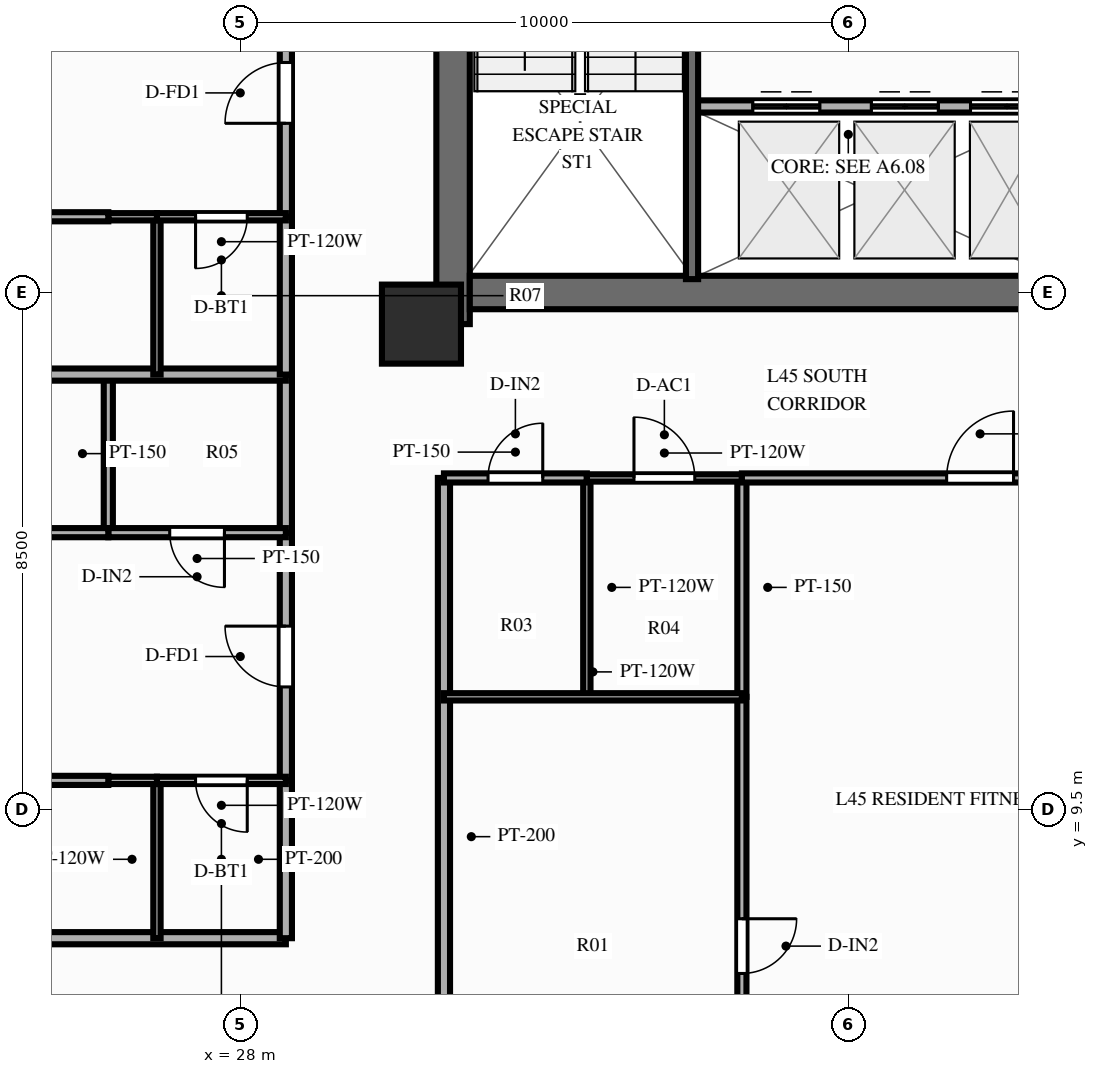
"""IFC4 building model, lengths in metres.
Left out: names, types, materials, properties, quantities, classifications, styles, units other than length and angle.
Written with IfcOpenShell. Run it as: python <this file> out.ifc"""

import sys

from ifc_helpers import new_model, si_unit, direction, frame, frame_2d, origin, origin_2d, place, context, subcontext, project, spatial, rectangle, extrude, source, transform, mapped, element, fill, save


model = new_model("IFC4")
c1 = context("Model", 3, precision=1e-05, world=origin(), true_north=direction((0.0, 1.0)))
c2 = subcontext(c1, "Body", "Model", "MODEL_VIEW")
j1 = project(units=[si_unit("LENGTHUNIT", "METRE"), si_unit("PLANEANGLEUNIT", "RADIAN")], contexts=[c1])
p1 = place(None, origin())
s1 = spatial("IfcSite", under=j1, at=p1, CompositionType="ELEMENT")
p2 = place(p1, origin())
s2 = spatial("IfcBuilding", under=s1, at=p2, CompositionType="ELEMENT")
p3 = place(p2, frame((0.0, 0.0, 141.75)))
s3 = spatial("IfcBuildingStorey", under=s2, at=p3, CompositionType="ELEMENT", Elevation=141.75)
p4 = place(p3, frame((31.5, 17.48, 0.0), z_axis=(0.0, 0.0, 1.0), x_axis=(0.0, 1.0, 0.0)))
e1 = element("IfcWall", 1, at=p4, inside=s3, PredefinedType="SHEAR", context=c2, shape_type="SweptSolid", body=[
    extrude(rectangle(XDim=19.04, YDim=0.55, at=frame_2d((9.52, 0.0))), origin(), (0.0, 0.0, 1.0), 3.0),
])
p5 = place(p4, frame((6.32, 0.0, 0.0)))
e2 = element("IfcOpeningElement", 2, at=p5, cuts=e1, PredefinedType="OPENING", context=c2, shape_type="SweptSolid", body=[
    extrude(rectangle(XDim=1.1, YDim=2.15, at=frame_2d((0.55, 1.075))), frame((0.0, 0.287, 0.0), z_axis=(0.0, -1.0, 0.0), x_axis=(1.0, 0.0, 0.0)), (0.0, 0.0, 1.0), 0.574),
])
p6 = place(p3, frame((31.775, 18.0, 0.0), z_axis=(0.0, 0.0, 1.0), x_axis=(1.0, 0.0, 0.0)))
e3 = element("IfcWall", 3, at=p6, inside=s3, PredefinedType="SHEAR", context=c2, shape_type="SweptSolid", body=[
    extrude(rectangle(XDim=12.45, YDim=0.55, at=frame_2d((6.225, 0.0))), origin(), (0.0, 0.0, 1.0), 3.0),
])
m1 = source(origin(), c2, "Body", "SweptSolid", [
    extrude(rectangle(XDim=1.3, YDim=1.3, at=origin_2d()), origin(), (0.0, 0.0, 1.0), 3.0),
])
p7 = place(p3, frame((30.98, 17.48, 0.0), z_axis=(0.0, 0.0, 1.0), x_axis=(1.0, 0.0, 0.0)))
e4 = element("IfcColumn", 4, at=p7, inside=s3, PredefinedType="COLUMN", context=c2, shape_type="MappedRepresentation", body=[
    mapped(m1, transform((0.0, 0.0, 0.0), scale=1.0)),
])
p8 = place(p3, frame((35.43, 21.06, 0.0), z_axis=(0.0, 0.0, 1.0), x_axis=(1.0, 0.0, 0.0)))
e5 = element("IfcWall", 5, at=p8, inside=s3, PredefinedType="PARTITIONING", context=c2, shape_type="SweptSolid", body=[
    extrude(rectangle(XDim=6.02, YDim=0.2, at=frame_2d((3.01, 0.0))), origin(), (0.0, 0.0, 1.0), 2.7),
])
p9 = place(p8, frame((1.0, 0.0, 0.0)))
e6 = element("IfcOpeningElement", 6, at=p9, cuts=e5, PredefinedType="OPENING", context=c2, shape_type="SweptSolid", body=[
    extrude(rectangle(XDim=1.1, YDim=2.15, at=frame_2d((0.55, 1.075))), frame((0.0, 0.112, 0.0), z_axis=(0.0, -1.0, 0.0), x_axis=(1.0, 0.0, 0.0)), (0.0, 0.0, 1.0), 0.224),
])
p10 = place(p8, frame((2.95, 0.0, 0.0)))
e7 = element("IfcOpeningElement", 7, at=p10, cuts=e5, PredefinedType="OPENING", context=c2, shape_type="SweptSolid", body=[
    extrude(rectangle(XDim=1.1, YDim=2.15, at=frame_2d((0.55, 1.075))), frame((0.0, 0.112, 0.0), z_axis=(0.0, -1.0, 0.0), x_axis=(1.0, 0.0, 0.0)), (0.0, 0.0, 1.0), 0.224),
])
p11 = place(p8, frame((4.58, 0.0, 0.0)))
e8 = element("IfcOpeningElement", 8, at=p11, cuts=e5, PredefinedType="OPENING", context=c2, shape_type="SweptSolid", body=[
    extrude(rectangle(XDim=1.2, YDim=2.15, at=frame_2d((0.6, 1.075))), frame((0.0, 0.112, 0.0), z_axis=(0.0, -1.0, 0.0), x_axis=(1.0, 0.0, 0.0)), (0.0, 0.0, 1.0), 0.224),
])
p12 = place(p3, frame((35.43, 18.22, 0.0), z_axis=(0.0, 0.0, 1.0), x_axis=(0.0, 1.0, 0.0)))
e9 = element("IfcWall", 9, at=p12, inside=s3, PredefinedType="SOLIDWALL", context=c2, shape_type="SweptSolid", body=[
    extrude(rectangle(XDim=7.22, YDim=0.2, at=frame_2d((3.61, 0.0))), origin(), (0.0, 0.0, 1.0), 2.7),
])
p13 = place(p12, frame((6.68, 0.0, 0.0), z_axis=(0.0, 0.0, 1.0), x_axis=(-1.0, 0.0, 0.0)))
e10 = element("IfcOpeningElement", 10, at=p13, cuts=e9, PredefinedType="OPENING", context=c2, shape_type="SweptSolid", body=[
    extrude(rectangle(XDim=1.1, YDim=2.15, at=frame_2d((0.55, 1.075))), frame((0.0, 0.112, 0.0), z_axis=(0.0, -1.0, 0.0), x_axis=(1.0, 0.0, 0.0)), (0.0, 0.0, 1.0), 0.224),
])
p14 = place(p3, frame((31.35, 14.95, 0.0), z_axis=(0.0, 0.0, 1.0), x_axis=(0.0, -1.0, 0.0)))
e11 = element("IfcWall", 11, at=p14, inside=s3, PredefinedType="PARTITIONING", context=c2, shape_type="SweptSolid", body=[
    extrude(rectangle(XDim=11.8, YDim=0.2, at=frame_2d((5.9, 0.0))), origin(), (0.0, 0.0, 1.0), 2.34),
])
p15 = place(p3, frame((33.7, 14.95, 0.0), z_axis=(0.0, 0.0, 1.0), x_axis=(0.0, -1.0, 0.0)))
e12 = element("IfcWall", 12, at=p15, inside=s3, PredefinedType="PARTITIONING", context=c2, shape_type="SweptSolid", body=[
    extrude(rectangle(XDim=3.6, YDim=0.12, at=frame_2d((1.8, 0.0))), origin(), (0.0, 0.0, 1.0), 2.7),
])
p16 = place(p3, frame((36.25, 14.95, 0.0), z_axis=(0.0, 0.0, 1.0), x_axis=(0.0, -1.0, 0.0)))
e13 = element("IfcWall", 13, at=p16, inside=s3, PredefinedType="PARTITIONING", context=c2, shape_type="SweptSolid", body=[
    extrude(rectangle(XDim=3.6, YDim=0.15, at=frame_2d((1.8, 0.0))), origin(), (0.0, 0.0, 1.0), 2.7),
])
p17 = place(p3, frame((36.25, 11.35, 0.0), z_axis=(0.0, 0.0, 1.0), x_axis=(0.0, -1.0, 0.0)))
e14 = element("IfcWall", 14, at=p17, inside=s3, PredefinedType="PARTITIONING", context=c2, shape_type="SweptSolid", body=[
    extrude(rectangle(XDim=8.2, YDim=0.15, at=frame_2d((4.1, 0.0))), origin(), (0.0, 0.0, 1.0), 2.7),
])
p18 = place(p17, frame((3.65, 0.0, 0.0)))
e15 = element("IfcOpeningElement", 15, at=p18, cuts=e14, PredefinedType="OPENING", context=c2, shape_type="SweptSolid", body=[
    extrude(rectangle(XDim=0.9, YDim=2.1, at=frame_2d((0.45, 1.05))), frame((0.0, 0.087, 0.0), z_axis=(0.0, -1.0, 0.0), x_axis=(1.0, 0.0, 0.0)), (0.0, 0.0, 1.0), 0.174),
])
p19 = place(p3, frame((31.35, 11.35, 0.0), z_axis=(0.0, 0.0, 1.0), x_axis=(1.0, 0.0, 0.0)))
e16 = element("IfcWall", 16, at=p19, inside=s3, PredefinedType="PARTITIONING", context=c2, shape_type="SweptSolid", body=[
    extrude(rectangle(XDim=4.9, YDim=0.12, at=frame_2d((2.45, 0.0))), origin(), (0.0, 0.0, 1.0), 2.7),
])
p20 = place(p3, frame((31.35, 14.95, 0.0), z_axis=(0.0, 0.0, 1.0), x_axis=(1.0, 0.0, 0.0)))
e17 = element("IfcWall", 17, at=p20, inside=s3, PredefinedType="PARTITIONING", context=c2, shape_type="SweptSolid", body=[
    extrude(rectangle(XDim=2.35, YDim=0.15, at=frame_2d((1.175, 0.0))), origin(), (0.0, 0.0, 1.0), 2.7),
])
p21 = place(p20, frame((0.725, 0.0, 0.0)))
e18 = element("IfcOpeningElement", 18, at=p21, cuts=e17, PredefinedType="OPENING", context=c2, shape_type="SweptSolid", body=[
    extrude(rectangle(XDim=0.9, YDim=2.1, at=frame_2d((0.45, 1.05))), frame((0.0, 0.087, 0.0), z_axis=(0.0, -1.0, 0.0), x_axis=(1.0, 0.0, 0.0)), (0.0, 0.0, 1.0), 0.174),
])
p22 = place(p3, frame((33.7, 14.95, 0.0), z_axis=(0.0, 0.0, 1.0), x_axis=(1.0, 0.0, 0.0)))
e19 = element("IfcWall", 19, at=p22, inside=s3, PredefinedType="PARTITIONING", context=c2, shape_type="SweptSolid", body=[
    extrude(rectangle(XDim=2.55, YDim=0.12, at=frame_2d((1.275, 0.0))), origin(), (0.0, 0.0, 1.0), 2.7),
])
p23 = place(p22, frame((0.775, 0.0, 0.0)))
e20 = element("IfcOpeningElement", 20, at=p23, cuts=e19, PredefinedType="OPENING", context=c2, shape_type="SweptSolid", body=[
    extrude(rectangle(XDim=1.0, YDim=2.1, at=frame_2d((0.5, 1.05))), frame((0.0, 0.072, 0.0), z_axis=(0.0, -1.0, 0.0), x_axis=(1.0, 0.0, 0.0)), (0.0, 0.0, 1.0), 0.144),
])
p24 = place(p3, frame((36.25, 14.95, 0.0), z_axis=(0.0, 0.0, 1.0), x_axis=(1.0, 0.0, 0.0)))
e21 = element("IfcWall", 21, at=p24, inside=s3, PredefinedType="PARTITIONING", context=c2, shape_type="SweptSolid", body=[
    extrude(rectangle(XDim=8.4, YDim=0.15, at=frame_2d((4.2, 0.0))), origin(), (0.0, 0.0, 1.0), 2.7),
])
p25 = place(p24, frame((3.367, 0.0, 0.0)))
e22 = element("IfcOpeningElement", 22, at=p25, cuts=e21, PredefinedType="OPENING", context=c2, shape_type="SweptSolid", body=[
    extrude(rectangle(XDim=1.1, YDim=2.15, at=frame_2d((0.55, 1.075))), frame((0.0, 0.087, 0.0), z_axis=(0.0, -1.0, 0.0), x_axis=(1.0, 0.0, 0.0)), (0.0, 0.0, 1.0), 0.174),
])
p26 = place(p3, frame((28.75, 7.38, 0.0), z_axis=(0.0, 0.0, 1.0), x_axis=(-1.0, 0.0, 0.0)))
e23 = element("IfcWall", 23, at=p26, inside=s3, PredefinedType="PARTITIONING", context=c2, shape_type="SweptSolid", body=[
    extrude(rectangle(XDim=16.6, YDim=0.2, at=frame_2d((8.3, 0.0))), origin(), (0.0, 0.0, 1.0), 2.7),
])
p27 = place(p3, frame((28.75, 7.38, 0.0), z_axis=(0.0, 0.0, 1.0), x_axis=(0.0, 1.0, 0.0)))
e24 = element("IfcWall", 24, at=p27, inside=s3, PredefinedType="PARTITIONING", context=c2, shape_type="SweptSolid", body=[
    extrude(rectangle(XDim=2.596, YDim=0.2, at=frame_2d((1.298, 0.0))), origin(), (0.0, 0.0, 1.0), 2.7),
])
p28 = place(p3, frame((28.75, 9.976, 0.0), z_axis=(0.0, 0.0, 1.0), x_axis=(0.0, 1.0, 0.0)))
e25 = element("IfcWall", 25, at=p28, inside=s3, PredefinedType="PARTITIONING", context=c2, shape_type="SweptSolid", body=[
    extrude(rectangle(XDim=4.074, YDim=0.2, at=frame_2d((2.037, 0.0))), origin(), (0.0, 0.0, 1.0), 2.7),
])
p29 = place(p28, frame((1.537, 0.0, 0.0)))
e26 = element("IfcOpeningElement", 26, at=p29, cuts=e25, PredefinedType="OPENING", context=c2, shape_type="SweptSolid", body=[
    extrude(rectangle(XDim=1.0, YDim=2.15, at=frame_2d((0.5, 1.075))), frame((0.0, 0.112, 0.0), z_axis=(0.0, -1.0, 0.0), x_axis=(1.0, 0.0, 0.0)), (0.0, 0.0, 1.0), 0.224),
])
p30 = place(p3, frame((28.75, 14.05, 0.0), z_axis=(0.0, 0.0, 1.0), x_axis=(0.0, 1.0, 0.0)))
e27 = element("IfcWall", 27, at=p30, inside=s3, PredefinedType="PARTITIONING", context=c2, shape_type="SweptSolid", body=[
    extrude(rectangle(XDim=2.6, YDim=0.2, at=frame_2d((1.3, 0.0))), origin(), (0.0, 0.0, 1.0), 2.7),
])
p31 = place(p3, frame((26.63, 7.38, 0.0), z_axis=(0.0, 0.0, 1.0), x_axis=(0.0, 1.0, 0.0)))
e28 = element("IfcWall", 28, at=p31, inside=s3, PredefinedType="PARTITIONING", context=c2, shape_type="SweptSolid", body=[
    extrude(rectangle(XDim=2.596, YDim=0.12, at=frame_2d((1.298, 0.0))), origin(), (0.0, 0.0, 1.0), 2.7),
])
p32 = place(p3, frame((25.83, 14.05, 0.0), z_axis=(0.0, 0.0, 1.0), x_axis=(0.0, 1.0, 0.0)))
e29 = element("IfcWall", 29, at=p32, inside=s3, PredefinedType="PARTITIONING", context=c2, shape_type="SweptSolid", body=[
    extrude(rectangle(XDim=2.6, YDim=0.15, at=frame_2d((1.3, 0.0))), origin(), (0.0, 0.0, 1.0), 2.7),
])
p33 = place(p3, frame((28.75, 9.976, 0.0), z_axis=(0.0, 0.0, 1.0), x_axis=(-1.0, 0.0, 0.0)))
e30 = element("IfcWall", 30, at=p33, inside=s3, PredefinedType="PARTITIONING", context=c2, shape_type="SweptSolid", body=[
    extrude(rectangle(XDim=2.12, YDim=0.12, at=frame_2d((1.06, 0.0))), origin(), (0.0, 0.0, 1.0), 2.7),
])
p34 = place(p33, frame((0.635, 0.0, 0.0)))
e31 = element("IfcOpeningElement", 31, at=p34, cuts=e30, PredefinedType="OPENING", context=c2, shape_type="SweptSolid", body=[
    extrude(rectangle(XDim=0.85, YDim=2.05, at=frame_2d((0.425, 1.025))), frame((0.0, 0.072, 0.0), z_axis=(0.0, -1.0, 0.0), x_axis=(1.0, 0.0, 0.0)), (0.0, 0.0, 1.0), 0.144),
])
p35 = place(p3, frame((26.63, 9.976, 0.0), z_axis=(0.0, 0.0, 1.0), x_axis=(-1.0, 0.0, 0.0)))
e32 = element("IfcWall", 32, at=p35, inside=s3, PredefinedType="PARTITIONING", context=c2, shape_type="SweptSolid", body=[
    extrude(rectangle(XDim=0.8, YDim=0.12, at=frame_2d((0.4, 0.0))), origin(), (0.0, 0.0, 1.0), 2.7),
])
p36 = place(p3, frame((25.83, 9.976, 0.0), z_axis=(0.0, 0.0, 1.0), x_axis=(-1.0, 0.0, 0.0)))
e33 = element("IfcWall", 33, at=p36, inside=s3, PredefinedType="PARTITIONING", context=c2, shape_type="SweptSolid", body=[
    extrude(rectangle(XDim=13.68, YDim=0.15, at=frame_2d((6.84, 0.0))), origin(), (0.0, 0.0, 1.0), 2.7),
])
p37 = place(p36, frame((5.877, 0.0, 0.0)))
e34 = element("IfcOpeningElement", 34, at=p37, cuts=e33, PredefinedType="OPENING", context=c2, shape_type="SweptSolid", body=[
    extrude(rectangle(XDim=0.9, YDim=2.1, at=frame_2d((0.45, 1.05))), frame((0.0, 0.087, 0.0), z_axis=(0.0, -1.0, 0.0), x_axis=(1.0, 0.0, 0.0)), (0.0, 0.0, 1.0), 0.174),
])
p38 = place(p3, frame((28.75, 14.05, 0.0), z_axis=(0.0, 0.0, 1.0), x_axis=(-1.0, 0.0, 0.0)))
e35 = element("IfcWall", 35, at=p38, inside=s3, PredefinedType="PARTITIONING", context=c2, shape_type="SweptSolid", body=[
    extrude(rectangle(XDim=2.92, YDim=0.15, at=frame_2d((1.46, 0.0))), origin(), (0.0, 0.0, 1.0), 2.7),
])
p39 = place(p38, frame((1.01, 0.0, 0.0)))
e36 = element("IfcOpeningElement", 36, at=p39, cuts=e35, PredefinedType="OPENING", context=c2, shape_type="SweptSolid", body=[
    extrude(rectangle(XDim=0.9, YDim=2.1, at=frame_2d((0.45, 1.05))), frame((0.0, 0.087, 0.0), z_axis=(0.0, -1.0, 0.0), x_axis=(1.0, 0.0, 0.0)), (0.0, 0.0, 1.0), 0.174),
])
p40 = place(p3, frame((25.83, 14.05, 0.0), z_axis=(0.0, 0.0, 1.0), x_axis=(-1.0, 0.0, 0.0)))
e37 = element("IfcWall", 37, at=p40, inside=s3, PredefinedType="PARTITIONING", context=c2, shape_type="SweptSolid", body=[
    extrude(rectangle(XDim=13.68, YDim=0.15, at=frame_2d((6.84, 0.0))), origin(), (0.0, 0.0, 1.0), 2.7),
])
p41 = place(p40, frame((5.877, 0.0, 0.0)))
e38 = element("IfcOpeningElement", 38, at=p41, cuts=e37, PredefinedType="OPENING", context=c2, shape_type="SweptSolid", body=[
    extrude(rectangle(XDim=0.9, YDim=2.1, at=frame_2d((0.45, 1.05))), frame((0.0, 0.087, 0.0), z_axis=(0.0, -1.0, 0.0), x_axis=(1.0, 0.0, 0.0)), (0.0, 0.0, 1.0), 0.174),
])
p42 = place(p3, frame((28.75, 16.65, 0.0), z_axis=(0.0, 0.0, 1.0), x_axis=(-1.0, 0.0, 0.0)))
e39 = element("IfcWall", 39, at=p42, inside=s3, PredefinedType="PARTITIONING", context=c2, shape_type="SweptSolid", body=[
    extrude(rectangle(XDim=16.6, YDim=0.2, at=frame_2d((8.3, 0.0))), origin(), (0.0, 0.0, 1.0), 2.7),
])
p43 = place(p3, frame((28.75, 16.65, 0.0), z_axis=(0.0, 0.0, 1.0), x_axis=(0.0, 1.0, 0.0)))
e40 = element("IfcWall", 40, at=p43, inside=s3, PredefinedType="PARTITIONING", context=c2, shape_type="SweptSolid", body=[
    extrude(rectangle(XDim=2.596, YDim=0.2, at=frame_2d((1.298, 0.0))), origin(), (0.0, 0.0, 1.0), 2.7),
])
p44 = place(p3, frame((28.75, 19.246, 0.0), z_axis=(0.0, 0.0, 1.0), x_axis=(0.0, 1.0, 0.0)))
e41 = element("IfcWall", 41, at=p44, inside=s3, PredefinedType="PARTITIONING", context=c2, shape_type="SweptSolid", body=[
    extrude(rectangle(XDim=4.074, YDim=0.2, at=frame_2d((2.037, 0.0))), origin(), (0.0, 0.0, 1.0), 2.7),
])
p45 = place(p44, frame((1.537, 0.0, 0.0)))
e42 = element("IfcOpeningElement", 42, at=p45, cuts=e41, PredefinedType="OPENING", context=c2, shape_type="SweptSolid", body=[
    extrude(rectangle(XDim=1.0, YDim=2.15, at=frame_2d((0.5, 1.075))), frame((0.0, 0.112, 0.0), z_axis=(0.0, -1.0, 0.0), x_axis=(1.0, 0.0, 0.0)), (0.0, 0.0, 1.0), 0.224),
])
p46 = place(p3, frame((26.63, 16.65, 0.0), z_axis=(0.0, 0.0, 1.0), x_axis=(0.0, 1.0, 0.0)))
e43 = element("IfcWall", 43, at=p46, inside=s3, PredefinedType="PARTITIONING", context=c2, shape_type="SweptSolid", body=[
    extrude(rectangle(XDim=2.596, YDim=0.12, at=frame_2d((1.298, 0.0))), origin(), (0.0, 0.0, 1.0), 2.7),
])
p47 = place(p3, frame((28.75, 19.246, 0.0), z_axis=(0.0, 0.0, 1.0), x_axis=(-1.0, 0.0, 0.0)))
e44 = element("IfcWall", 44, at=p47, inside=s3, PredefinedType="PARTITIONING", context=c2, shape_type="SweptSolid", body=[
    extrude(rectangle(XDim=2.12, YDim=0.12, at=frame_2d((1.06, 0.0))), origin(), (0.0, 0.0, 1.0), 2.7),
])
p48 = place(p47, frame((0.635, 0.0, 0.0)))
e45 = element("IfcOpeningElement", 45, at=p48, cuts=e44, PredefinedType="OPENING", context=c2, shape_type="SweptSolid", body=[
    extrude(rectangle(XDim=0.85, YDim=2.05, at=frame_2d((0.425, 1.025))), frame((0.0, 0.072, 0.0), z_axis=(0.0, -1.0, 0.0), x_axis=(1.0, 0.0, 0.0)), (0.0, 0.0, 1.0), 0.144),
])
p49 = place(p3, frame((26.63, 19.246, 0.0), z_axis=(0.0, 0.0, 1.0), x_axis=(-1.0, 0.0, 0.0)))
e46 = element("IfcWall", 46, at=p49, inside=s3, PredefinedType="PARTITIONING", context=c2, shape_type="SweptSolid", body=[
    extrude(rectangle(XDim=0.8, YDim=0.12, at=frame_2d((0.4, 0.0))), origin(), (0.0, 0.0, 1.0), 2.7),
])
p50 = place(p3, frame((25.83, 19.246, 0.0), z_axis=(0.0, 0.0, 1.0), x_axis=(-1.0, 0.0, 0.0)))
e47 = element("IfcWall", 47, at=p50, inside=s3, PredefinedType="PARTITIONING", context=c2, shape_type="SweptSolid", body=[
    extrude(rectangle(XDim=13.68, YDim=0.15, at=frame_2d((6.84, 0.0))), origin(), (0.0, 0.0, 1.0), 2.7),
])
p51 = place(p50, frame((5.877, 0.0, 0.0)))
e48 = element("IfcOpeningElement", 48, at=p51, cuts=e47, PredefinedType="OPENING", context=c2, shape_type="SweptSolid", body=[
    extrude(rectangle(XDim=0.9, YDim=2.1, at=frame_2d((0.45, 1.05))), frame((0.0, 0.087, 0.0), z_axis=(0.0, -1.0, 0.0), x_axis=(1.0, 0.0, 0.0)), (0.0, 0.0, 1.0), 0.174),
])
m2 = source(origin(), c2, "Body", "SweptSolid", [
    extrude(rectangle(XDim=1.1, YDim=2.15, at=frame_2d((0.55, 1.075))), frame((0.0, 0.025, 0.0), z_axis=(0.0, -1.0, 0.0), x_axis=(1.0, 0.0, 0.0)), (0.0, 0.0, 1.0), 0.05),
])
p52 = place(p9, origin())
e49 = element("IfcDoor", 49, at=p52, inside=s3, OperationType="DOUBLE_DOOR_SLIDING", PredefinedType="DOOR", context=c2, shape_type="MappedRepresentation", body=[
    mapped(m2, transform((0.0, 0.0, 0.0), scale=1.0)),
])
fill(e6, e49)
p53 = place(p10, origin())
e50 = element("IfcDoor", 50, at=p53, inside=s3, OperationType="DOUBLE_DOOR_SLIDING", PredefinedType="DOOR", context=c2, shape_type="MappedRepresentation", body=[
    mapped(m2, transform((0.0, 0.0, 0.0), scale=1.0)),
])
fill(e7, e50)
m3 = source(origin(), c2, "Body", "SweptSolid", [
    extrude(rectangle(XDim=1.2, YDim=2.15, at=frame_2d((0.6, 1.075))), frame((0.0, 0.025, 0.0), z_axis=(0.0, -1.0, 0.0), x_axis=(1.0, 0.0, 0.0)), (0.0, 0.0, 1.0), 0.05),
])
p54 = place(p11, origin())
e51 = element("IfcDoor", 51, at=p54, inside=s3, OperationType="DOUBLE_DOOR_SLIDING", PredefinedType="DOOR", context=c2, shape_type="MappedRepresentation", body=[
    mapped(m3, transform((0.0, 0.0, 0.0), scale=1.0)),
])
fill(e8, e51)
m4 = source(origin(), c2, "Body", "SweptSolid", [
    extrude(rectangle(XDim=0.9, YDim=2.1, at=frame_2d((0.45, 1.05))), frame((0.0, 0.025, 0.0), z_axis=(0.0, -1.0, 0.0), x_axis=(1.0, 0.0, 0.0)), (0.0, 0.0, 1.0), 0.05),
])
p55 = place(p18, origin())
e52 = element("IfcDoor", 52, at=p55, inside=s3, OperationType="SINGLE_SWING_LEFT", PredefinedType="DOOR", context=c2, shape_type="MappedRepresentation", body=[
    mapped(m4, transform((0.0, 0.0, 0.0), scale=1.0)),
])
fill(e15, e52)
p56 = place(p21, origin())
e53 = element("IfcDoor", 53, at=p56, inside=s3, OperationType="SINGLE_SWING_RIGHT", PredefinedType="DOOR", context=c2, shape_type="MappedRepresentation", body=[
    mapped(m4, transform((0.0, 0.0, 0.0), scale=1.0)),
])
fill(e18, e53)
m5 = source(origin(), c2, "Body", "SweptSolid", [
    extrude(rectangle(XDim=1.0, YDim=2.1, at=frame_2d((0.5, 1.05))), frame((0.0, 0.025, 0.0), z_axis=(0.0, -1.0, 0.0), x_axis=(1.0, 0.0, 0.0)), (0.0, 0.0, 1.0), 0.05),
])
p57 = place(p23, origin())
e54 = element("IfcDoor", 54, at=p57, inside=s3, OperationType="SINGLE_SWING_LEFT", PredefinedType="DOOR", context=c2, shape_type="MappedRepresentation", body=[
    mapped(m5, transform((0.0, 0.0, 0.0), scale=1.0)),
])
fill(e20, e54)
p58 = place(p25, origin())
e55 = element("IfcDoor", 55, at=p58, inside=s3, OperationType="SINGLE_SWING_RIGHT", PredefinedType="DOOR", context=c2, shape_type="MappedRepresentation", body=[
    mapped(m2, transform((0.0, 0.0, 0.0), scale=1.0)),
])
fill(e22, e55)
m6 = source(origin(), c2, "Body", "SweptSolid", [
    extrude(rectangle(XDim=1.0, YDim=2.15, at=frame_2d((0.5, 1.075))), frame((0.0, 0.025, 0.0), z_axis=(0.0, -1.0, 0.0), x_axis=(1.0, 0.0, 0.0)), (0.0, 0.0, 1.0), 0.05),
])
p59 = place(p29, origin())
e56 = element("IfcDoor", 56, at=p59, inside=s3, OperationType="SINGLE_SWING_RIGHT", PredefinedType="DOOR", context=c2, shape_type="MappedRepresentation", body=[
    mapped(m6, transform((0.0, 0.0, 0.0), scale=1.0)),
])
fill(e26, e56)
m7 = source(origin(), c2, "Body", "SweptSolid", [
    extrude(rectangle(XDim=0.85, YDim=2.05, at=frame_2d((0.425, 1.025))), frame((0.0, 0.025, 0.0), z_axis=(0.0, -1.0, 0.0), x_axis=(1.0, 0.0, 0.0)), (0.0, 0.0, 1.0), 0.05),
])
p60 = place(p34, origin())
e57 = element("IfcDoor", 57, at=p60, inside=s3, OperationType="SINGLE_SWING_LEFT", PredefinedType="DOOR", context=c2, shape_type="MappedRepresentation", body=[
    mapped(m7, transform((0.0, 0.0, 0.0), scale=1.0)),
])
fill(e31, e57)
p61 = place(p39, origin())
e58 = element("IfcDoor", 58, at=p61, inside=s3, OperationType="SINGLE_SWING_LEFT", PredefinedType="DOOR", context=c2, shape_type="MappedRepresentation", body=[
    mapped(m4, transform((0.0, 0.0, 0.0), scale=1.0)),
])
fill(e36, e58)
p62 = place(p45, origin())
e59 = element("IfcDoor", 59, at=p62, inside=s3, OperationType="SINGLE_SWING_LEFT", PredefinedType="DOOR", context=c2, shape_type="MappedRepresentation", body=[
    mapped(m6, transform((0.0, 0.0, 0.0), scale=1.0)),
])
fill(e42, e59)
p63 = place(p48, origin())
e60 = element("IfcDoor", 60, at=p63, inside=s3, OperationType="SINGLE_SWING_RIGHT", PredefinedType="DOOR", context=c2, shape_type="MappedRepresentation", body=[
    mapped(m7, transform((0.0, 0.0, 0.0), scale=1.0)),
])
fill(e45, e60)
save(model, sys.argv[1])
